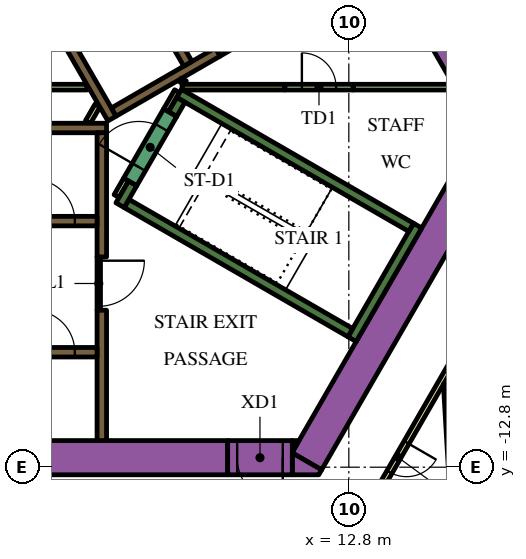
"""IFC4 building model, lengths in metres.
Left out: names, types, materials, properties, quantities, classifications, styles, units other than length and angle.
Written with IfcOpenShell. Run it as: python <this file> out.ifc"""

import sys

from ifc_helpers import new_model, si_unit, direction, frame, frame_2d, origin, place, context, subcontext, project, spatial, polyline, rectangle, outline, extrude, element, fill, save


model = new_model("IFC4")
c1 = context("Model", 3, precision=1e-05, world=origin(), true_north=direction((0.0, 1.0)))
c2 = subcontext(c1, "Body", "Model", "MODEL_VIEW")
j1 = project(units=[si_unit("LENGTHUNIT", "METRE"), si_unit("PLANEANGLEUNIT", "RADIAN")], contexts=[c1])
p1 = place(None, origin())
s1 = spatial("IfcSite", under=j1, at=p1, CompositionType="ELEMENT")
p2 = place(p1, origin())
s2 = spatial("IfcBuilding", under=s1, at=p2, CompositionType="ELEMENT")
p3 = place(p2, frame((0.0, 0.0, 130.5)))
s3 = spatial("IfcBuildingStorey", under=s2, at=p3, CompositionType="ELEMENT", Elevation=130.5)
p4 = place(p3, frame((6.776, 13.364, 0.0), z_axis=(0.0, 0.0, 1.0), x_axis=(0.500004177138, -0.8660229921, 0.0)))
e1 = element("IfcWall", 1, at=p4, inside=s3, PredefinedType="SOLIDWALL", context=c2, shape_type="SweptSolid", body=[
    extrude(rectangle(XDim=20.204, YDim=0.9, at=frame_2d((10.102, 0.0))), origin(), (0.0, 0.0, 1.0), 3.9),
])
p5 = place(p3, frame((11.695, -12.644, 0.0), z_axis=(0.0, 0.0, 1.0), x_axis=(0.500010229568, 0.86601949766, 0.0)))
e2 = element("IfcWall", 2, at=p5, inside=s3, PredefinedType="SOLIDWALL", context=c2, shape_type="SweptSolid", body=[
    extrude(rectangle(XDim=9.326, YDim=0.9, at=frame_2d((4.663, 0.0))), origin(), (0.0, 0.0, 1.0), 3.9),
])
p6 = place(p3, origin())
e3 = element("IfcWall", 3, at=p6, inside=s3, PredefinedType="SOLIDWALL", context=c2, shape_type="SweptSolid", body=[
    extrude(outline(polyline([(12.009, -13.0), (11.312, -13.0), (11.312, -12.425), (12.083, -12.871), (12.009, -13.0)])), origin(), (0.0, 0.0, 1.0), 3.9),
])
e4 = element("IfcWall", 4, at=p6, inside=s3, PredefinedType="SOLIDWALL", context=c2, shape_type="SweptSolid", body=[
    extrude(outline(polyline([(11.489, -12.1), (11.312, -12.407), (11.312, -12.1), (11.489, -12.1)])), origin(), (0.0, 0.0, 1.0), 3.9),
])
p7 = place(p3, frame((-12.019, -12.55, 0.0), z_axis=(0.0, 0.0, 1.0), x_axis=(1.0, 0.0, 0.0)))
e5 = element("IfcWall", 5, at=p7, inside=s3, PredefinedType="SOLIDWALL", context=c2, shape_type="SweptSolid", body=[
    extrude(rectangle(XDim=21.63, YDim=0.9, at=frame_2d((10.815, 0.0))), origin(), (0.0, 0.0, 1.0), 3.9),
])
p8 = place(p3, frame((12.885, -9.431, 0.0), z_axis=(0.0, 0.0, 1.0), x_axis=(0.500020560727, 0.866013532718, 0.0)))
e6 = element("IfcWall", 6, at=p8, inside=s3, PredefinedType="SOLIDWALL", context=c2, shape_type="SweptSolid", body=[
    extrude(rectangle(XDim=3.45, YDim=0.25, at=frame_2d((1.725, 0.0))), origin(), (0.0, 0.0, 1.0), 3.9),
])
p9 = place(p3, frame((12.84, -9.261, 0.0), z_axis=(0.0, 0.0, 1.0), x_axis=(-0.866013990052, 0.500019768644, 0.0)))
e7 = element("IfcWall", 7, at=p9, inside=s3, PredefinedType="SOLIDWALL", context=c2, shape_type="SweptSolid", body=[
    extrude(rectangle(XDim=6.8, YDim=0.25, at=frame_2d((3.4, 0.0))), origin(), (0.0, 0.0, 1.0), 3.9),
])
p10 = place(p3, frame((7.113, -5.33, 0.0), z_axis=(0.0, 0.0, 1.0), x_axis=(-0.499965889992, -0.866045096311, 0.0)))
e8 = element("IfcWall", 8, at=p10, inside=s3, PredefinedType="SOLIDWALL", context=c2, shape_type="SweptSolid", body=[
    extrude(rectangle(XDim=0.666, YDim=0.25, at=frame_2d((0.333, 0.0))), origin(), (0.0, 0.0, 1.0), 3.9),
])
p11 = place(p3, frame((8.334, -2.964, 0.0), z_axis=(0.0, 0.0, 1.0), x_axis=(0.866016039709, -0.500016218704, 0.0)))
e9 = element("IfcWall", 9, at=p11, inside=s3, PredefinedType="SOLIDWALL", context=c2, shape_type="SweptSolid", body=[
    extrude(rectangle(XDim=7.05, YDim=0.25, at=frame_2d((3.525, 0.0))), origin(), (0.0, 0.0, 1.0), 3.9),
])
p12 = place(p3, frame((8.163, -3.511, 0.0), z_axis=(0.0, 0.0, 1.0), x_axis=(0.500127794843, 0.865951608824, 0.0)))
e10 = element("IfcWall", 10, at=p12, inside=s3, PredefinedType="SOLIDWALL", context=c2, shape_type="SweptSolid", body=[
    extrude(rectangle(XDim=0.435, YDim=0.25, at=frame_2d((0.217, 0.0))), origin(), (0.0, 0.0, 1.0), 3.9),
])
p13 = place(p3, frame((-6.19, -3.875, 0.0), z_axis=(0.0, 0.0, 1.0), x_axis=(1.0, 0.0, 0.0)))
e11 = element("IfcWall", 11, at=p13, inside=s3, PredefinedType="SOLIDWALL", context=c2, shape_type="SweptSolid", body=[
    extrude(rectangle(XDim=12.615, YDim=0.25, at=frame_2d((6.307, 0.0))), origin(), (0.0, 0.0, 1.0), 3.9),
])
p14 = place(p3, frame((6.3, -8.67, 0.0), z_axis=(0.0, 0.0, 1.0), x_axis=(0.0, -1.0, 0.0)))
e12 = element("IfcWall", 12, at=p14, inside=s3, PredefinedType="SOLIDWALL", context=c2, shape_type="SweptSolid", body=[
    extrude(rectangle(XDim=3.43, YDim=0.25, at=frame_2d((1.715, 0.0))), origin(), (0.0, 0.0, 1.0), 3.9),
])
p15 = place(p3, frame((6.3, -7.268, 0.0), z_axis=(0.0, 0.0, 1.0), x_axis=(0.0, 1.0, 0.0)))
e13 = element("IfcWall", 13, at=p15, inside=s3, PredefinedType="SOLIDWALL", context=c2, shape_type="SweptSolid", body=[
    extrude(rectangle(XDim=3.268, YDim=0.25, at=frame_2d((1.634, 0.0))), origin(), (0.0, 0.0, 1.0), 3.9),
])
e14 = element("IfcWall", 14, at=p6, inside=s3, PredefinedType="SOLIDWALL", context=c2, shape_type="SweptSolid", body=[
    extrude(outline(polyline([(0.335, 6.925), (0.335, 7.075), (0.335, 7.075), (0.335, 7.075), (0.245, 7.075), (0.035, 7.439), (0.252, 7.564), (0.377, 7.348), (1.512, 5.382), (1.637, 5.165), (2.221, 4.153), (2.771, 3.199), (2.896, 2.983), (3.138, 2.564), (4.031, 1.017), (4.156, 0.801), (5.292, -1.165), (5.417, -1.382), (6.073, -2.519), (6.552, -3.348), (6.677, -3.564), (6.46, -3.689), (0.332, 6.925), (0.335, 6.925), (0.335, 6.925), (0.335, 6.925)])), origin(), (0.0, 0.0, 1.0), 3.9),
])
p16 = place(p3, frame((9.352, -1.875, 0.0), z_axis=(0.0, 0.0, 1.0), x_axis=(-0.866024844342, -0.500000968981, 0.0)))
e15 = element("IfcWall", 15, at=p16, inside=s3, PredefinedType="SOLIDWALL", context=c2, shape_type="SweptSolid", body=[
    extrude(rectangle(XDim=3.162, YDim=0.25, at=frame_2d((1.581, 0.0))), origin(), (0.0, 0.0, 1.0), 3.9),
])
p17 = place(p3, frame((6.688, -5.667, 0.0), z_axis=(0.0, 0.0, 1.0), x_axis=(0.499834152157, 0.86612113491, 0.0)))
e16 = element("IfcWall", 16, at=p17, inside=s3, PredefinedType="PARTITIONING", context=c2, shape_type="SweptSolid", body=[
    extrude(rectangle(XDim=0.505, YDim=0.15, at=frame_2d((0.252, 0.0))), origin(), (0.0, 0.0, 1.0), 2.6),
])
p18 = place(p3, frame((5.936, -3.718, 0.0), z_axis=(0.0, 0.0, 1.0), x_axis=(0.499890179513, 0.866088799389, 0.0)))
e17 = element("IfcWall", 17, at=p18, inside=s3, PredefinedType="PARTITIONING", context=c2, shape_type="SweptSolid", body=[
    extrude(rectangle(XDim=0.504, YDim=0.15, at=frame_2d((0.252, 0.0))), origin(), (0.0, 0.0, 1.0), 2.6),
])
p19 = place(p3, frame((8.412, -2.8, 0.0), z_axis=(0.0, 0.0, 1.0), x_axis=(1.0, 0.0, 0.0)))
e18 = element("IfcWall", 18, at=p19, inside=s3, PredefinedType="PARTITIONING", context=c2, shape_type="SweptSolid", body=[
    extrude(rectangle(XDim=2.702, YDim=0.15, at=frame_2d((1.351, 0.0))), origin(), (0.0, 0.0, 1.0), 3.9),
])
p20 = place(p3, frame((8.459, -2.599, 0.0), z_axis=(0.0, 0.0, 1.0), x_axis=(-0.501919277433, -0.864914469148, 0.0)))
e19 = element("IfcWall", 19, at=p20, inside=s3, PredefinedType="PARTITIONING", context=c2, shape_type="SweptSolid", body=[
    extrude(rectangle(XDim=0.109, YDim=0.15, at=frame_2d((0.054, 0.0))), origin(), (0.0, 0.0, 1.0), 3.9),
])
p21 = place(p3, frame((8.281, -2.907, 0.0), z_axis=(0.0, 0.0, 1.0), x_axis=(-0.500193841991, -0.86591346013, 0.0)))
e20 = element("IfcWall", 20, at=p21, inside=s3, PredefinedType="PARTITIONING", context=c2, shape_type="SweptSolid", body=[
    extrude(rectangle(XDim=0.583, YDim=0.15, at=frame_2d((0.292, 0.0))), origin(), (0.0, 0.0, 1.0), 3.9),
])
p22 = place(p3, frame((3.238, -2.8, 0.0), z_axis=(0.0, 0.0, 1.0), x_axis=(1.0, 0.0, 0.0)))
e21 = element("IfcWall", 21, at=p22, inside=s3, PredefinedType="PARTITIONING", context=c2, shape_type="SweptSolid", body=[
    extrude(rectangle(XDim=2.672, YDim=0.15, at=frame_2d((1.336, 0.0))), origin(), (0.0, 0.0, 1.0), 2.6),
])
p23 = place(p3, frame((12.915, -2.8, 0.0), z_axis=(0.0, 0.0, 1.0), x_axis=(1.0, 0.0, 0.0)))
e22 = element("IfcWall", 22, at=p23, inside=s3, PredefinedType="PARTITIONING", context=c2, shape_type="SweptSolid", body=[
    extrude(rectangle(XDim=2.637, YDim=0.15, at=frame_2d((1.318, 0.0))), origin(), (0.0, 0.0, 1.0), 2.6),
])
p24 = place(p3, frame((-6.175, -9.775, 0.0), z_axis=(0.0, 0.0, 1.0), x_axis=(1.0, 0.0, 0.0)))
e23 = element("IfcWall", 23, at=p24, inside=s3, PredefinedType="SOLIDWALL", context=c2, shape_type="SweptSolid", body=[
    extrude(rectangle(XDim=12.35, YDim=0.25, at=frame_2d((6.175, 0.0))), origin(), (0.0, 0.0, 1.0), 3.9),
])
p25 = place(p24, frame((0.585, 0.0, 0.0)))
e24 = element("IfcOpeningElement", 24, at=p25, cuts=e23, PredefinedType="OPENING", context=c2, shape_type="SweptSolid", body=[
    extrude(rectangle(XDim=1.1, YDim=2.1, at=frame_2d((0.55, 1.05))), frame((0.0, 0.135, 0.0), z_axis=(0.0, -1.0, 0.0), x_axis=(1.0, 0.0, 0.0)), (0.0, 0.0, 1.0), 0.27),
])
p26 = place(p24, frame((3.105, 0.0, 0.0)))
e25 = element("IfcOpeningElement", 25, at=p26, cuts=e23, PredefinedType="OPENING", context=c2, shape_type="SweptSolid", body=[
    extrude(rectangle(XDim=1.1, YDim=2.1, at=frame_2d((0.55, 1.05))), frame((0.0, 0.135, 0.0), z_axis=(0.0, -1.0, 0.0), x_axis=(1.0, 0.0, 0.0)), (0.0, 0.0, 1.0), 0.27),
])
p27 = place(p24, frame((5.625, 0.0, 0.0)))
e26 = element("IfcOpeningElement", 26, at=p27, cuts=e23, PredefinedType="OPENING", context=c2, shape_type="SweptSolid", body=[
    extrude(rectangle(XDim=1.1, YDim=2.1, at=frame_2d((0.55, 1.05))), frame((0.0, 0.135, 0.0), z_axis=(0.0, -1.0, 0.0), x_axis=(1.0, 0.0, 0.0)), (0.0, 0.0, 1.0), 0.27),
])
p28 = place(p24, frame((8.145, 0.0, 0.0)))
e27 = element("IfcOpeningElement", 27, at=p28, cuts=e23, PredefinedType="OPENING", context=c2, shape_type="SweptSolid", body=[
    extrude(rectangle(XDim=1.1, YDim=2.1, at=frame_2d((0.55, 1.05))), frame((0.0, 0.135, 0.0), z_axis=(0.0, -1.0, 0.0), x_axis=(1.0, 0.0, 0.0)), (0.0, 0.0, 1.0), 0.27),
])
p29 = place(p24, frame((10.665, 0.0, 0.0)))
e28 = element("IfcOpeningElement", 28, at=p29, cuts=e23, PredefinedType="OPENING", context=c2, shape_type="SweptSolid", body=[
    extrude(rectangle(XDim=1.1, YDim=2.1, at=frame_2d((0.55, 1.05))), frame((0.0, 0.135, 0.0), z_axis=(0.0, -1.0, 0.0), x_axis=(1.0, 0.0, 0.0)), (0.0, 0.0, 1.0), 0.27),
])
p30 = place(p3, frame((-6.175, -6.325, 0.0), z_axis=(0.0, 0.0, 1.0), x_axis=(1.0, 0.0, 0.0)))
e29 = element("IfcWall", 29, at=p30, inside=s3, PredefinedType="SOLIDWALL", context=c2, shape_type="SweptSolid", body=[
    extrude(rectangle(XDim=12.35, YDim=0.25, at=frame_2d((6.175, 0.0))), origin(), (0.0, 0.0, 1.0), 3.9),
])
p31 = place(p30, frame((3.205, 0.0, 0.0)))
e30 = element("IfcOpeningElement", 30, at=p31, cuts=e29, PredefinedType="OPENING", context=c2, shape_type="SweptSolid", body=[
    extrude(rectangle(XDim=0.9, YDim=2.1, at=frame_2d((0.45, 1.05))), frame((0.0, 0.135, 0.0), z_axis=(0.0, -1.0, 0.0), x_axis=(1.0, 0.0, 0.0)), (0.0, 0.0, 1.0), 0.27),
])
p32 = place(p30, frame((8.145, 0.0, 0.0)))
e31 = element("IfcOpeningElement", 31, at=p32, cuts=e29, PredefinedType="OPENING", context=c2, shape_type="SweptSolid", body=[
    extrude(rectangle(XDim=1.1, YDim=2.1, at=frame_2d((0.55, 1.05))), frame((0.0, 0.135, 0.0), z_axis=(0.0, -1.0, 0.0), x_axis=(1.0, 0.0, 0.0)), (0.0, 0.0, 1.0), 0.27),
])
p33 = place(p30, frame((10.665, 0.0, 0.0)))
e32 = element("IfcOpeningElement", 32, at=p33, cuts=e29, PredefinedType="OPENING", context=c2, shape_type="SweptSolid", body=[
    extrude(rectangle(XDim=1.1, YDim=2.1, at=frame_2d((0.55, 1.05))), frame((0.0, 0.135, 0.0), z_axis=(0.0, -1.0, 0.0), x_axis=(1.0, 0.0, 0.0)), (0.0, 0.0, 1.0), 0.27),
])
p34 = place(p3, frame((8.565, -2.185, 0.0), z_axis=(0.0, 0.0, 1.0), x_axis=(-0.499997954832, 0.866026584559, 0.0)))
e33 = element("IfcWall", 33, at=p34, inside=s3, PredefinedType="SOLIDWALL", context=c2, shape_type="SweptSolid", body=[
    extrude(rectangle(XDim=12.35, YDim=0.25, at=frame_2d((6.175, 0.0))), origin(), (0.0, 0.0, 1.0), 3.9),
])
p35 = place(p34, frame((5.725, 0.0, 0.0)))
e34 = element("IfcOpeningElement", 34, at=p35, cuts=e33, PredefinedType="OPENING", context=c2, shape_type="SweptSolid", body=[
    extrude(rectangle(XDim=0.9, YDim=2.1, at=frame_2d((0.45, 1.05))), frame((0.0, 0.135, 0.0), z_axis=(0.0, -1.0, 0.0), x_axis=(1.0, 0.0, 0.0)), (0.0, 0.0, 1.0), 0.27),
])
p36 = place(p3, frame((7.048, -5.292, 0.0), z_axis=(0.0, 0.0, 1.0), x_axis=(0.49994051562, 0.866059744384, 0.0)))
e35 = element("IfcWall", 35, at=p36, inside=s3, PredefinedType="SOLIDWALL", context=c2, shape_type="SweptSolid", body=[
    extrude(rectangle(XDim=2.1, YDim=0.4, at=frame_2d((1.05, 0.0))), origin(), (0.0, 0.0, 1.0), 3.9),
])
p37 = place(p36, frame((0.45, 0.0, 0.0)))
e36 = element("IfcOpeningElement", 36, at=p37, cuts=e35, PredefinedType="OPENING", context=c2, shape_type="SweptSolid", body=[
    extrude(rectangle(XDim=1.2, YDim=2.1, at=frame_2d((0.6, 1.05))), frame((0.0, 0.21, 0.0), z_axis=(0.0, -1.0, 0.0), x_axis=(1.0, 0.0, 0.0)), (0.0, 0.0, 1.0), 0.42),
])
p38 = place(p3, frame((6.22, -7.266, 0.0), z_axis=(0.0, 0.0, 1.0), x_axis=(0.0, -1.0, 0.0)))
e37 = element("IfcWall", 37, at=p38, inside=s3, PredefinedType="PARTITIONING", context=c2, shape_type="SweptSolid", body=[
    extrude(rectangle(XDim=1.4, YDim=0.09, at=frame_2d((0.7, 0.0))), origin(), (0.0, 0.0, 1.0), 2.6),
])
p39 = place(p38, frame((0.1, 0.0, 0.0)))
e38 = element("IfcOpeningElement", 38, at=p39, cuts=e37, PredefinedType="OPENING", context=c2, shape_type="SweptSolid", body=[
    extrude(rectangle(XDim=1.2, YDim=2.1, at=frame_2d((0.6, 1.05))), frame((0.0, 0.055, 0.0), z_axis=(0.0, -1.0, 0.0), x_axis=(1.0, 0.0, 0.0)), (0.0, 0.0, 1.0), 0.11),
])
p40 = place(p3, frame((11.312, -12.55, 0.0), z_axis=(0.0, 0.0, 1.0), x_axis=(-1.0, 0.0, 0.0)))
e39 = element("IfcWall", 39, at=p40, inside=s3, PredefinedType="SOLIDWALL", context=c2, shape_type="SweptSolid", body=[
    extrude(rectangle(XDim=1.7, YDim=0.9, at=frame_2d((0.85, 0.0))), origin(), (0.0, 0.0, 1.0), 3.9),
])
p41 = place(p40, frame((0.25, 0.0, 0.0)))
e40 = element("IfcOpeningElement", 40, at=p41, cuts=e39, PredefinedType="OPENING", context=c2, shape_type="SweptSolid", body=[
    extrude(rectangle(XDim=1.2, YDim=2.1, at=frame_2d((0.6, 1.05))), frame((0.0, 0.46, 0.0), z_axis=(0.0, -1.0, 0.0), x_axis=(1.0, 0.0, 0.0)), (0.0, 0.0, 1.0), 0.92),
])
p42 = place(p3, frame((9.352, -1.875, 0.0), z_axis=(0.0, 0.0, 1.0), x_axis=(0.865989075817, 0.500062916607, 0.0)))
e41 = element("IfcWall", 41, at=p42, inside=s3, PredefinedType="SOLIDWALL", context=c2, shape_type="SweptSolid", body=[
    extrude(rectangle(XDim=1.8, YDim=0.25, at=frame_2d((0.9, 0.0))), origin(), (0.0, 0.0, 1.0), 3.9),
])
p43 = place(p42, frame((0.45, 0.0, 0.0)))
e42 = element("IfcOpeningElement", 42, at=p43, cuts=e41, PredefinedType="OPENING", context=c2, shape_type="SweptSolid", body=[
    extrude(rectangle(XDim=0.9, YDim=2.1, at=frame_2d((0.45, 1.05))), frame((0.0, 0.135, 0.0), z_axis=(0.0, -1.0, 0.0), x_axis=(1.0, 0.0, 0.0)), (0.0, 0.0, 1.0), 0.27),
])
p44 = place(p3, frame((11.115, -2.8, 0.0), z_axis=(0.0, 0.0, 1.0), x_axis=(1.0, 0.0, 0.0)))
e43 = element("IfcWall", 43, at=p44, inside=s3, PredefinedType="PARTITIONING", context=c2, shape_type="SweptSolid", body=[
    extrude(rectangle(XDim=1.8, YDim=0.15, at=frame_2d((0.9, 0.0))), origin(), (0.0, 0.0, 1.0), 2.6),
])
p45 = place(p44, frame((0.45, 0.0, 0.0)))
e44 = element("IfcOpeningElement", 44, at=p45, cuts=e43, PredefinedType="OPENING", context=c2, shape_type="SweptSolid", body=[
    extrude(rectangle(XDim=0.9, YDim=2.1, at=frame_2d((0.45, 1.05))), frame((0.0, 0.085, 0.0), z_axis=(0.0, -1.0, 0.0), x_axis=(1.0, 0.0, 0.0)), (0.0, 0.0, 1.0), 0.17),
])
p46 = place(p3, frame((6.163, 18.475, 0.0), z_axis=(0.0, 0.0, 1.0), x_axis=(0.500001317485, -0.866024643133, 0.0)))
e45 = element("IfcWall", 45, at=p46, inside=s3, PredefinedType="PARTITIONING", context=c2, shape_type="SweptSolid", body=[
    extrude(rectangle(XDim=25.767, YDim=0.15, at=frame_2d((12.883, 0.0))), origin(), (0.0, 0.0, 1.0), 2.6),
])
p47 = place(p46, frame((21.774, 0.0, 0.0)))
e46 = element("IfcOpeningElement", 46, at=p47, cuts=e45, PredefinedType="OPENING", context=c2, shape_type="SweptSolid", body=[
    extrude(rectangle(XDim=1.0, YDim=2.1, at=frame_2d((0.5, 1.05))), frame((0.0, 0.085, 0.0), z_axis=(0.0, -1.0, 0.0), x_axis=(1.0, 0.0, 0.0)), (0.0, 0.0, 1.0), 0.17),
])
p48 = place(p46, frame((15.571, 0.0, 0.0)))
e47 = element("IfcOpeningElement", 47, at=p48, cuts=e45, PredefinedType="OPENING", context=c2, shape_type="SweptSolid", body=[
    extrude(rectangle(XDim=1.0, YDim=2.1, at=frame_2d((0.5, 1.05))), frame((0.0, 0.085, 0.0), z_axis=(0.0, -1.0, 0.0), x_axis=(1.0, 0.0, 0.0)), (0.0, 0.0, 1.0), 0.17),
])
p49 = place(p46, frame((9.265, 0.0, 0.0)))
e48 = element("IfcOpeningElement", 48, at=p49, cuts=e45, PredefinedType="OPENING", context=c2, shape_type="SweptSolid", body=[
    extrude(rectangle(XDim=1.0, YDim=2.1, at=frame_2d((0.5, 1.05))), frame((0.0, 0.085, 0.0), z_axis=(0.0, -1.0, 0.0), x_axis=(1.0, 0.0, 0.0)), (0.0, 0.0, 1.0), 0.17),
])
p50 = place(p46, frame((3.063, 0.0, 0.0)))
e49 = element("IfcOpeningElement", 49, at=p50, cuts=e45, PredefinedType="OPENING", context=c2, shape_type="SweptSolid", body=[
    extrude(rectangle(XDim=1.0, YDim=2.1, at=frame_2d((0.5, 1.05))), frame((0.0, 0.085, 0.0), z_axis=(0.0, -1.0, 0.0), x_axis=(1.0, 0.0, 0.0)), (0.0, 0.0, 1.0), 0.17),
])
p51 = place(p3, frame((15.587, -9.952, 0.0), z_axis=(0.0, 0.0, 1.0), x_axis=(-0.500016618951, -0.866015808616, 0.0)))
e50 = element("IfcWall", 50, at=p51, inside=s3, PredefinedType="PARTITIONING", context=c2, shape_type="SweptSolid", body=[
    extrude(rectangle(XDim=5.268, YDim=0.15, at=frame_2d((2.634, 0.0))), origin(), (0.0, 0.0, 1.0), 2.6),
])
p52 = place(p51, frame((2.538, 0.0, 0.0)))
e51 = element("IfcOpeningElement", 51, at=p52, cuts=e50, PredefinedType="OPENING", context=c2, shape_type="SweptSolid", body=[
    extrude(rectangle(XDim=0.9, YDim=2.1, at=frame_2d((0.45, 1.05))), frame((0.0, 0.085, 0.0), z_axis=(0.0, -1.0, 0.0), x_axis=(1.0, 0.0, 0.0)), (0.0, 0.0, 1.0), 0.17),
])
p53 = place(p3, frame((15.999, -21.467, 0.0), z_axis=(0.0, 0.0, 1.0), x_axis=(-0.058433825336, 0.998291284173, 0.0)))
e52 = element("IfcWall", 52, at=p53, inside=s3, PredefinedType="PARTITIONING", context=c2, shape_type="SweptSolid", body=[
    extrude(rectangle(XDim=10.875, YDim=0.15, at=frame_2d((5.438, 0.0))), origin(), (0.0, 0.0, 1.0), 2.6),
])
p54 = place(p29, origin())
e53 = element("IfcDoor", 53, at=p54, inside=s3, OperationType="DOUBLE_DOOR_SLIDING", PredefinedType="DOOR", context=c2, shape_type="SweptSolid", body=[
    extrude(rectangle(XDim=1.1, YDim=2.1, at=frame_2d((0.55, 1.05))), frame((0.0, 0.025, 0.0), z_axis=(0.0, -1.0, 0.0), x_axis=(1.0, 0.0, 0.0)), (0.0, 0.0, 1.0), 0.05),
])
fill(e28, e53)
p55 = place(p33, origin())
e54 = element("IfcDoor", 54, at=p55, inside=s3, OperationType="DOUBLE_DOOR_SLIDING", PredefinedType="DOOR", context=c2, shape_type="SweptSolid", body=[
    extrude(rectangle(XDim=1.1, YDim=2.1, at=frame_2d((0.55, 1.05))), frame((0.0, 0.025, 0.0), z_axis=(0.0, -1.0, 0.0), x_axis=(1.0, 0.0, 0.0)), (0.0, 0.0, 1.0), 0.05),
])
fill(e32, e54)
p56 = place(p37, origin())
e55 = element("IfcDoor", 55, at=p56, inside=s3, OperationType="SINGLE_SWING_LEFT", PredefinedType="DOOR", context=c2, shape_type="SweptSolid", body=[
    extrude(rectangle(XDim=1.2, YDim=2.1, at=frame_2d((0.6, 1.05))), frame((0.0, 0.025, 0.0), z_axis=(0.0, -1.0, 0.0), x_axis=(1.0, 0.0, 0.0)), (0.0, 0.0, 1.0), 0.05),
])
fill(e36, e55)
p57 = place(p39, origin())
e56 = element("IfcDoor", 56, at=p57, inside=s3, OperationType="SINGLE_SWING_LEFT", PredefinedType="DOOR", context=c2, shape_type="SweptSolid", body=[
    extrude(rectangle(XDim=1.2, YDim=2.1, at=frame_2d((0.6, 1.05))), frame((0.0, 0.025, 0.0), z_axis=(0.0, -1.0, 0.0), x_axis=(1.0, 0.0, 0.0)), (0.0, 0.0, 1.0), 0.05),
])
fill(e38, e56)
p58 = place(p41, origin())
e57 = element("IfcDoor", 57, at=p58, inside=s3, OperationType="SINGLE_SWING_LEFT", PredefinedType="DOOR", context=c2, shape_type="SweptSolid", body=[
    extrude(rectangle(XDim=1.2, YDim=2.1, at=frame_2d((0.6, 1.05))), frame((0.0, 0.025, 0.0), z_axis=(0.0, -1.0, 0.0), x_axis=(1.0, 0.0, 0.0)), (0.0, 0.0, 1.0), 0.05),
])
fill(e40, e57)
p59 = place(p45, origin())
e58 = element("IfcDoor", 58, at=p59, inside=s3, OperationType="SINGLE_SWING_LEFT", PredefinedType="DOOR", context=c2, shape_type="SweptSolid", body=[
    extrude(rectangle(XDim=0.9, YDim=2.1, at=frame_2d((0.45, 1.05))), frame((0.0, 0.025, 0.0), z_axis=(0.0, -1.0, 0.0), x_axis=(1.0, 0.0, 0.0)), (0.0, 0.0, 1.0), 0.05),
])
fill(e44, e58)
p60 = place(p52, origin())
e59 = element("IfcDoor", 59, at=p60, inside=s3, OperationType="SINGLE_SWING_LEFT", PredefinedType="DOOR", context=c2, shape_type="SweptSolid", body=[
    extrude(rectangle(XDim=0.9, YDim=2.1, at=frame_2d((0.45, 1.05))), frame((0.0, 0.025, 0.0), z_axis=(0.0, -1.0, 0.0), x_axis=(1.0, 0.0, 0.0)), (0.0, 0.0, 1.0), 0.05),
])
fill(e51, e59)
save(model, sys.argv[1])
